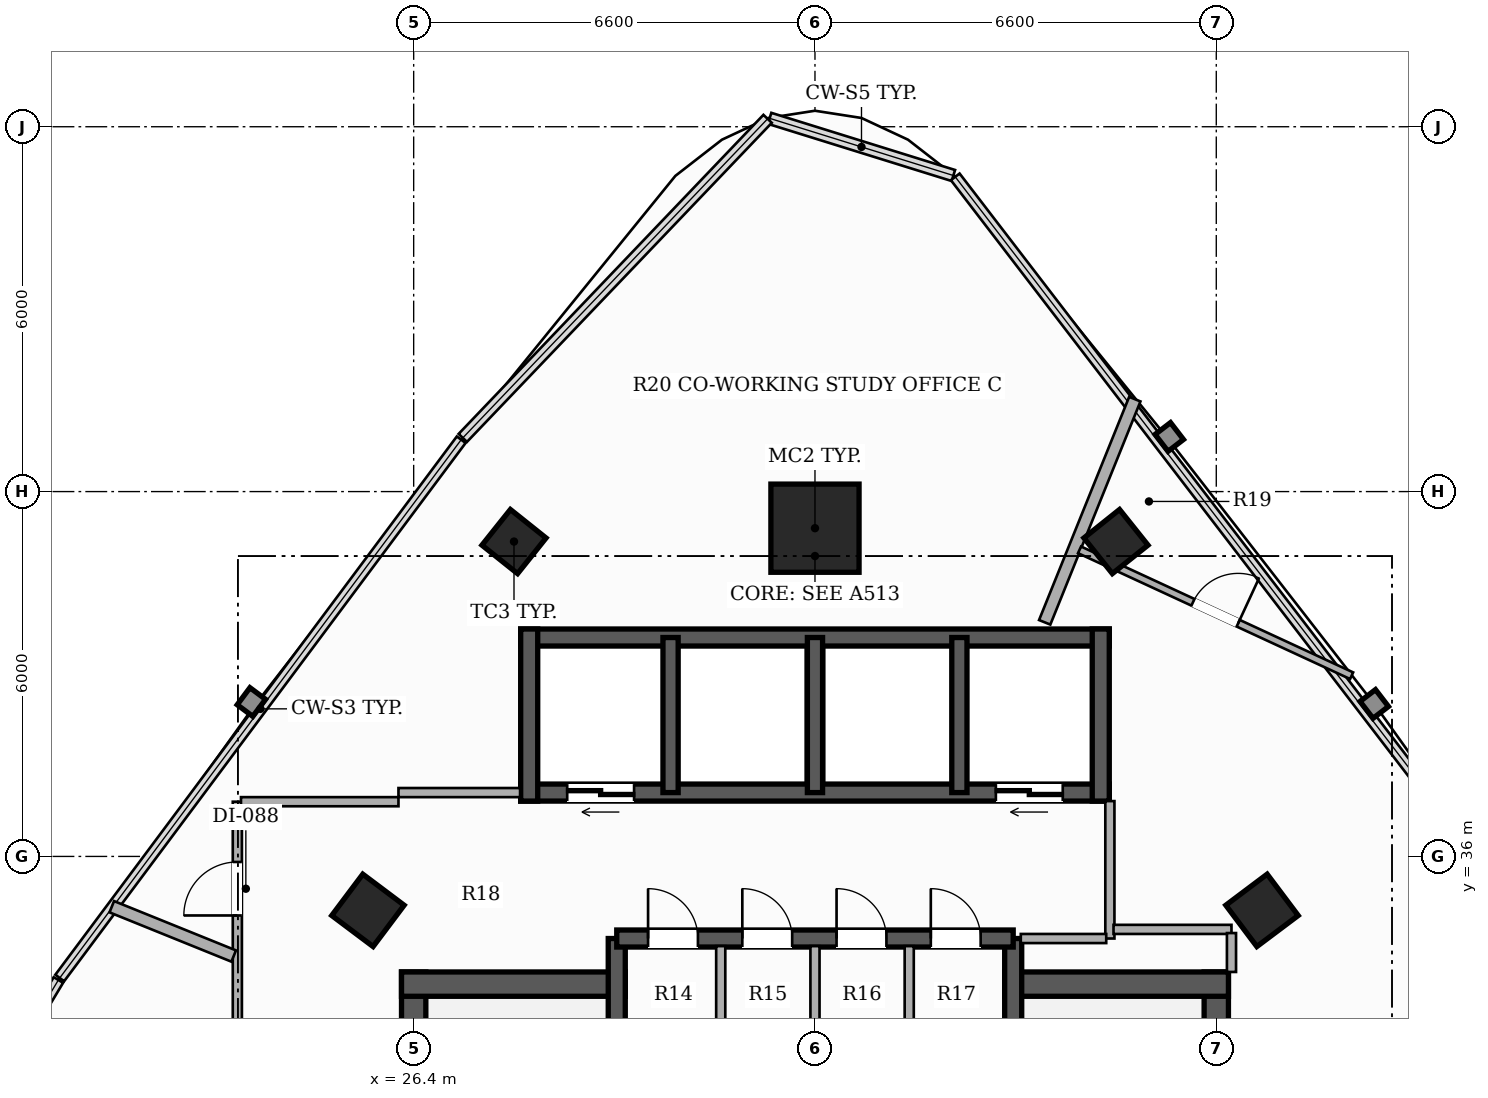
"""IFC4 building model, lengths in metres.
Left out: names, types, materials, properties, quantities, classifications, styles, units other than length and angle.
Written with IfcOpenShell. Run it as: python <this file> out.ifc"""

import sys

from ifc_helpers import new_model, si_unit, direction, frame, frame_2d, origin, origin_2d, place, context, subcontext, project, spatial, rectangle, hollow_rectangle, extrude, element, fill, save


model = new_model("IFC4")
c1 = context("Model", 3, precision=1e-05, world=origin(), true_north=direction((0.0, 1.0)))
c2 = subcontext(c1, "Body", "Model", "MODEL_VIEW")
j1 = project(units=[si_unit("LENGTHUNIT", "METRE"), si_unit("PLANEANGLEUNIT", "RADIAN")], contexts=[c1])
p1 = place(None, origin())
s1 = spatial("IfcSite", under=j1, at=p1, CompositionType="ELEMENT")
p2 = place(p1, origin())
s2 = spatial("IfcBuilding", under=s1, at=p2, CompositionType="ELEMENT")
p3 = place(p2, frame((0.0, 0.0, 157.25)))
s3 = spatial("IfcBuildingStorey", under=s2, at=p3, CompositionType="ELEMENT", Elevation=157.25)
p4 = place(p3, frame((26.4, 26.5, 0.0), z_axis=(0.0, 0.0, 1.0), x_axis=(0.0, 1.0, 0.0)))
e1 = element("IfcWall", 1, at=p4, inside=s3, PredefinedType="SHEAR", context=c2, shape_type="SweptSolid", body=[
    extrude(rectangle(XDim=7.6, YDim=0.4, at=frame_2d((3.8, 0.0))), origin(), (0.0, 0.0, 1.0), 3.3),
])
p5 = place(p3, frame((26.2, 33.9, 0.0), z_axis=(0.0, 0.0, 1.0), x_axis=(1.0, 0.0, 0.0)))
e2 = element("IfcWall", 2, at=p5, inside=s3, PredefinedType="SHEAR", context=c2, shape_type="SweptSolid", body=[
    extrude(rectangle(XDim=3.68, YDim=0.4, at=frame_2d((1.84, 0.0))), origin(), (0.0, 0.0, 1.0), 3.3),
])
p6 = place(p3, frame((39.6, 26.5, 0.0), z_axis=(0.0, 0.0, 1.0), x_axis=(0.0, 1.0, 0.0)))
e3 = element("IfcWall", 3, at=p6, inside=s3, PredefinedType="SHEAR", context=c2, shape_type="SweptSolid", body=[
    extrude(rectangle(XDim=7.6, YDim=0.4, at=frame_2d((3.8, 0.0))), origin(), (0.0, 0.0, 1.0), 3.3),
])
p7 = place(p3, frame((36.12, 33.9, 0.0), z_axis=(0.0, 0.0, 1.0), x_axis=(1.0, 0.0, 0.0)))
e4 = element("IfcWall", 4, at=p7, inside=s3, PredefinedType="SHEAR", context=c2, shape_type="SweptSolid", body=[
    extrude(rectangle(XDim=3.68, YDim=0.4, at=frame_2d((1.84, 0.0))), origin(), (0.0, 0.0, 1.0), 3.3),
])
p8 = place(p3, frame((29.74, 26.5, 0.0), z_axis=(0.0, 0.0, 1.0), x_axis=(0.0, 1.0, 0.0)))
e5 = element("IfcWall", 5, at=p8, inside=s3, PredefinedType="SHEAR", context=c2, shape_type="SweptSolid", body=[
    extrude(rectangle(XDim=8.15, YDim=0.28, at=frame_2d((4.075, 0.0))), origin(), (0.0, 0.0, 1.0), 3.3),
])
p9 = place(p8, frame((0.6, 0.0, 0.0)))
e6 = element("IfcOpeningElement", 6, at=p9, cuts=e5, PredefinedType="OPENING", context=c2, shape_type="SweptSolid", body=[
    extrude(rectangle(XDim=1.05, YDim=2.15, at=frame_2d((0.525, 1.075))), frame((0.0, 0.15, 0.0), z_axis=(0.0, -1.0, 0.0), x_axis=(1.0, 0.0, 0.0)), (0.0, 0.0, 1.0), 0.3),
])
p10 = place(p3, frame((36.26, 26.5, 0.0), z_axis=(0.0, 0.0, 1.0), x_axis=(0.0, 1.0, 0.0)))
e7 = element("IfcWall", 7, at=p10, inside=s3, PredefinedType="SHEAR", context=c2, shape_type="SweptSolid", body=[
    extrude(rectangle(XDim=8.15, YDim=0.28, at=frame_2d((4.075, 0.0))), origin(), (0.0, 0.0, 1.0), 3.3),
])
p11 = place(p10, frame((0.6, 0.0, 0.0)))
e8 = element("IfcOpeningElement", 8, at=p11, cuts=e7, PredefinedType="OPENING", context=c2, shape_type="SweptSolid", body=[
    extrude(rectangle(XDim=1.05, YDim=2.15, at=frame_2d((0.525, 1.075))), frame((0.0, 0.15, 0.0), z_axis=(0.0, -1.0, 0.0), x_axis=(1.0, 0.0, 0.0)), (0.0, 0.0, 1.0), 0.3),
])
p12 = place(p3, frame((29.74, 34.65, 0.0), z_axis=(0.0, 0.0, 1.0), x_axis=(1.0, 0.0, 0.0)))
e9 = element("IfcWall", 9, at=p12, inside=s3, PredefinedType="SHEAR", context=c2, shape_type="SweptSolid", body=[
    extrude(rectangle(XDim=6.52, YDim=0.28, at=frame_2d((3.26, 0.0))), origin(), (0.0, 0.0, 1.0), 3.3),
])
p13 = place(p12, frame((0.515, 0.0, 0.0)))
e10 = element("IfcOpeningElement", 10, at=p13, cuts=e9, PredefinedType="OPENING", context=c2, shape_type="SweptSolid", body=[
    extrude(rectangle(XDim=0.82, YDim=2.1, at=frame_2d((0.41, 1.05))), frame((0.0, 0.15, 0.0), z_axis=(0.0, -1.0, 0.0), x_axis=(1.0, 0.0, 0.0)), (0.0, 0.0, 1.0), 0.3),
])
p14 = place(p12, frame((2.065, 0.0, 0.0)))
e11 = element("IfcOpeningElement", 11, at=p14, cuts=e9, PredefinedType="OPENING", context=c2, shape_type="SweptSolid", body=[
    extrude(rectangle(XDim=0.82, YDim=2.1, at=frame_2d((0.41, 1.05))), frame((0.0, 0.15, 0.0), z_axis=(0.0, -1.0, 0.0), x_axis=(1.0, 0.0, 0.0)), (0.0, 0.0, 1.0), 0.3),
])
p15 = place(p12, frame((3.615, 0.0, 0.0)))
e12 = element("IfcOpeningElement", 12, at=p15, cuts=e9, PredefinedType="OPENING", context=c2, shape_type="SweptSolid", body=[
    extrude(rectangle(XDim=0.82, YDim=2.1, at=frame_2d((0.41, 1.05))), frame((0.0, 0.15, 0.0), z_axis=(0.0, -1.0, 0.0), x_axis=(1.0, 0.0, 0.0)), (0.0, 0.0, 1.0), 0.3),
])
p16 = place(p12, frame((5.165, 0.0, 0.0)))
e13 = element("IfcOpeningElement", 13, at=p16, cuts=e9, PredefinedType="OPENING", context=c2, shape_type="SweptSolid", body=[
    extrude(rectangle(XDim=0.82, YDim=2.1, at=frame_2d((0.41, 1.05))), frame((0.0, 0.15, 0.0), z_axis=(0.0, -1.0, 0.0), x_axis=(1.0, 0.0, 0.0)), (0.0, 0.0, 1.0), 0.3),
])
p17 = place(p3, frame((37.84, 37.05, 0.0), z_axis=(0.0, 0.0, 1.0), x_axis=(-1.0, 0.0, 0.0)))
e14 = element("IfcWall", 14, at=p17, inside=s3, PredefinedType="SHEAR", context=c2, shape_type="SweptSolid", body=[
    extrude(rectangle(XDim=9.68, YDim=0.28, at=frame_2d((4.84, 0.0))), origin(), (0.0, 0.0, 1.0), 3.3),
])
p18 = place(p17, frame((7.815, 0.0, 0.0)))
e15 = element("IfcOpeningElement", 15, at=p18, cuts=e14, PredefinedType="OPENING", context=c2, shape_type="SweptSolid", body=[
    extrude(rectangle(XDim=1.1, YDim=2.2, at=frame_2d((0.55, 1.1))), frame((0.0, 0.15, 0.0), z_axis=(0.0, -1.0, 0.0), x_axis=(1.0, 0.0, 0.0)), (0.0, 0.0, 1.0), 0.3),
])
p19 = place(p17, frame((0.765, 0.0, 0.0)))
e16 = element("IfcOpeningElement", 16, at=p19, cuts=e14, PredefinedType="OPENING", context=c2, shape_type="SweptSolid", body=[
    extrude(rectangle(XDim=1.1, YDim=2.2, at=frame_2d((0.55, 1.1))), frame((0.0, 0.15, 0.0), z_axis=(0.0, -1.0, 0.0), x_axis=(1.0, 0.0, 0.0)), (0.0, 0.0, 1.0), 0.3),
])
p20 = place(p3, frame((28.16, 39.6, 0.0), z_axis=(0.0, 0.0, 1.0), x_axis=(1.0, 0.0, 0.0)))
e17 = element("IfcWall", 17, at=p20, inside=s3, PredefinedType="SHEAR", context=c2, shape_type="SweptSolid", body=[
    extrude(rectangle(XDim=9.68, YDim=0.28, at=frame_2d((4.84, 0.0))), origin(), (0.0, 0.0, 1.0), 3.3),
])
for number, where, z_axis, x_axis in (
    (18, (28.3, 36.91, 0.0), (0.0, 0.0, 1.0), (0.0, 1.0, 0.0)),
    (19, (37.7, 36.91, 0.0), (0.0, 0.0, 1.0), (0.0, 1.0, 0.0)),
):
    element("IfcWall", number, at=place(p3, frame(where, z_axis=z_axis, x_axis=x_axis)), inside=s3, PredefinedType="SHEAR", context=c2, shape_type="SweptSolid", body=[
        extrude(rectangle(XDim=2.83, YDim=0.28, at=frame_2d((1.415, 0.0))), origin(), (0.0, 0.0, 1.0), 3.3),
    ])
for number, where, z_axis, x_axis in (
    (20, (30.625, 37.05, 0.0), (0.0, 0.0, 1.0), (0.0, 1.0, 0.0)),
    (21, (33.0, 37.05, 0.0), (0.0, 0.0, 1.0), (0.0, 1.0, 0.0)),
    (22, (35.375, 37.05, 0.0), (0.0, 0.0, 1.0), (0.0, 1.0, 0.0)),
):
    element("IfcWall", number, at=place(p3, frame(where, z_axis=z_axis, x_axis=x_axis)), inside=s3, PredefinedType="SHEAR", context=c2, shape_type="SweptSolid", body=[
        extrude(rectangle(XDim=2.55, YDim=0.25, at=frame_2d((1.275, 0.0))), origin(), (0.0, 0.0, 1.0), 3.3),
    ])
p21 = place(p3, frame((33.0, 41.398, 0.0), z_axis=(0.0, 0.0, 1.0), x_axis=(1.0, 0.0, 0.0)))
e23 = element("IfcColumn", 23, at=p21, inside=s3, PredefinedType="COLUMN", context=c2, shape_type="SweptSolid", body=[
    extrude(hollow_rectangle(XDim=1.45, YDim=1.45, WallThickness=0.045, at=origin_2d()), origin(), (0.0, 0.0, 1.0), 3.3),
])
for number, where, z_axis, x_axis in (
    (24, (25.648, 35.113, 0.0), (0.0, 0.0, 1.0), (0.6, 0.8, 0.0)),
    (25, (40.352, 35.113, 0.0), (0.0, 0.0, 1.0), (-0.6, 0.8, 0.0)),
):
    element("IfcColumn", number, at=place(p3, frame(where, z_axis=z_axis, x_axis=x_axis)), inside=s3, PredefinedType="COLUMN", context=c2, shape_type="SweptSolid", body=[
        extrude(hollow_rectangle(XDim=0.85, YDim=0.85, WallThickness=0.028, at=origin_2d()), origin(), (0.0, 0.0, 1.0), 3.3),
    ])
for number, where, z_axis, x_axis in (
    (26, (28.05, 41.178, 0.0), (0.0, 0.0, 1.0), (0.624, 0.782, 0.0)),
    (27, (37.95, 41.178, 0.0), (0.0, 0.0, 1.0), (-0.624, 0.782, 0.0)),
):
    element("IfcColumn", number, at=place(p3, frame(where, z_axis=z_axis, x_axis=x_axis)), inside=s3, PredefinedType="COLUMN", context=c2, shape_type="SweptSolid", body=[
        extrude(hollow_rectangle(XDim=0.75, YDim=0.75, WallThickness=0.025, at=origin_2d()), origin(), (0.0, 0.0, 1.0), 3.3),
    ])
p22 = place(p3, frame((37.85, 34.65, 0.0), z_axis=(0.0, 0.0, 1.0), x_axis=(0.0, 1.0, 0.0)))
e28 = element("IfcWall", 28, at=p22, inside=s3, PredefinedType="PARTITIONING", context=c2, shape_type="SweptSolid", body=[
    extrude(rectangle(XDim=2.26, YDim=0.15, at=frame_2d((1.13, 0.0))), origin(), (0.0, 0.0, 1.0), 3.06),
])
p23 = place(p3, frame((36.385, 34.65, 0.0), z_axis=(0.0, 0.0, 1.0), x_axis=(1.0, 0.0, 0.0)))
e29 = element("IfcWall", 29, at=p23, inside=s3, PredefinedType="PARTITIONING", context=c2, shape_type="SweptSolid", body=[
    extrude(rectangle(XDim=1.405, YDim=0.15, at=frame_2d((0.703, 0.0))), origin(), (0.0, 0.0, 1.0), 2.425),
])
for number, where, z_axis, x_axis in (
    (30, (31.45, 32.915, 0.0), (0.0, 0.0, 1.0), (0.0, 1.0, 0.0)),
    (31, (33.0, 32.915, 0.0), (0.0, 0.0, 1.0), (0.0, 1.0, 0.0)),
    (32, (34.55, 32.915, 0.0), (0.0, 0.0, 1.0), (0.0, 1.0, 0.0)),
):
    element("IfcWall", number, at=place(p3, frame(where, z_axis=z_axis, x_axis=x_axis)), inside=s3, PredefinedType="PARTITIONING", context=c2, shape_type="SweptSolid", body=[
        extrude(rectangle(XDim=1.61, YDim=0.15, at=frame_2d((0.805, 0.0))), origin(), (0.0, 0.0, 1.0), 3.06),
    ])
p24 = place(p3, frame((23.5, 14.06, 0.0), z_axis=(0.0, 0.0, 1.0), x_axis=(0.0, 1.0, 0.0)))
e33 = element("IfcWall", 33, at=p24, inside=s3, PredefinedType="PARTITIONING", context=c2, shape_type="SweptSolid", body=[
    extrude(rectangle(XDim=22.84, YDim=0.15, at=frame_2d((11.42, 0.0))), origin(), (0.0, 0.0, 1.0), 2.413),
])
p25 = place(p24, frame((8.172, 0.0, 0.0)))
e34 = element("IfcOpeningElement", 34, at=p25, cuts=e33, PredefinedType="OPENING", context=c2, shape_type="SweptSolid", body=[
    extrude(rectangle(XDim=0.88, YDim=2.1, at=frame_2d((0.44, 1.05))), frame((0.0, 0.085, 0.0), z_axis=(0.0, -1.0, 0.0), x_axis=(1.0, 0.0, 0.0)), (0.0, 0.0, 1.0), 0.17),
])
p26 = place(p24, frame((20.969, 0.0, 0.0)))
e35 = element("IfcOpeningElement", 35, at=p26, cuts=e33, PredefinedType="OPENING", context=c2, shape_type="SweptSolid", body=[
    extrude(rectangle(XDim=0.88, YDim=2.1, at=frame_2d((0.44, 1.05))), frame((0.0, 0.085, 0.0), z_axis=(0.0, -1.0, 0.0), x_axis=(1.0, 0.0, 0.0)), (0.0, 0.0, 1.0), 0.17),
])
p27 = place(p24, frame((15.484, 0.0, 0.0)))
e36 = element("IfcOpeningElement", 36, at=p27, cuts=e33, PredefinedType="OPENING", context=c2, shape_type="SweptSolid", body=[
    extrude(rectangle(XDim=0.88, YDim=2.1, at=frame_2d((0.44, 1.05))), frame((0.0, 0.085, 0.0), z_axis=(0.0, -1.0, 0.0), x_axis=(1.0, 0.0, 0.0)), (0.0, 0.0, 1.0), 0.17),
])
p28 = place(p3, frame((23.56, 36.9, 0.0), z_axis=(0.0, 0.0, 1.0), x_axis=(1.0, 0.0, 0.0)))
e37 = element("IfcWall", 37, at=p28, inside=s3, PredefinedType="PARTITIONING", context=c2, shape_type="SweptSolid", body=[
    extrude(rectangle(XDim=2.59, YDim=0.15, at=frame_2d((1.295, 0.0))), origin(), (0.0, 0.0, 1.0), 2.413),
])
p29 = place(p3, frame((26.15, 37.05, 0.0), z_axis=(0.0, 0.0, 1.0), x_axis=(1.0, 0.0, 0.0)))
e38 = element("IfcWall", 38, at=p29, inside=s3, PredefinedType="PARTITIONING", context=c2, shape_type="SweptSolid", body=[
    extrude(rectangle(XDim=2.0, YDim=0.15, at=frame_2d((1.0, 0.0))), origin(), (0.0, 0.0, 1.0), 2.413),
])
p30 = place(p3, frame((37.91, 34.8, 0.0), z_axis=(0.0, 0.0, 1.0), x_axis=(1.0, 0.0, 0.0)))
e39 = element("IfcWall", 39, at=p30, inside=s3, PredefinedType="PARTITIONING", context=c2, shape_type="SweptSolid", body=[
    extrude(rectangle(XDim=1.94, YDim=0.15, at=frame_2d((0.97, 0.0))), origin(), (0.0, 0.0, 1.0), 2.721),
])
p31 = place(p3, frame((39.85, 34.74, 0.0), z_axis=(0.0, 0.0, 1.0), x_axis=(0.0, -1.0, 0.0)))
e40 = element("IfcWall", 40, at=p31, inside=s3, PredefinedType="PARTITIONING", context=c2, shape_type="SweptSolid", body=[
    extrude(rectangle(XDim=0.64, YDim=0.15, at=frame_2d((0.32, 0.0))), origin(), (0.0, 0.0, 1.0), 2.721),
])
p32 = place(p3, frame((36.778, 39.85, 0.0), z_axis=(0.0, 0.0, 1.0), x_axis=(0.374430412004, 0.927255017008, 0.0)))
e41 = element("IfcWall", 41, at=p32, inside=s3, PredefinedType="PARTITIONING", context=c2, shape_type="SweptSolid", body=[
    extrude(rectangle(XDim=3.958, YDim=0.2, at=frame_2d((1.979, 0.0))), origin(), (0.0, 0.0, 1.0), 2.413),
])
p33 = place(p3, frame((23.44, 34.362, 0.0), z_axis=(0.0, 0.0, 1.0), x_axis=(-0.927021575741, 0.375007997395, 0.0)))
e42 = element("IfcWall", 42, at=p33, inside=s3, PredefinedType="PARTITIONING", context=c2, shape_type="SweptSolid", body=[
    extrude(rectangle(XDim=2.163, YDim=0.2, at=frame_2d((1.081, 0.0))), origin(), (0.0, 0.0, 1.0), 3.06),
])
p34 = place(p3, frame((37.351, 41.042, 0.0), z_axis=(0.0, 0.0, 1.0), x_axis=(0.907592371503, -0.419852458834, 0.0)))
e43 = element("IfcWall", 43, at=p34, inside=s3, PredefinedType="PARTITIONING", context=c2, shape_type="SweptSolid", body=[
    extrude(rectangle(XDim=4.93, YDim=0.12, at=frame_2d((2.465, 0.0))), origin(), (0.0, 0.0, 1.0), 2.413),
])
p35 = place(p34, frame((2.055, 0.0, 0.0)))
e44 = element("IfcOpeningElement", 44, at=p35, cuts=e43, PredefinedType="OPENING", context=c2, shape_type="SweptSolid", body=[
    extrude(rectangle(XDim=0.82, YDim=2.1, at=frame_2d((0.41, 1.05))), frame((0.0, 0.07, 0.0), z_axis=(0.0, -1.0, 0.0), x_axis=(1.0, 0.0, 0.0)), (0.0, 0.0, 1.0), 0.14),
])
p36 = place(p18, origin())
e45 = element("IfcDoor", 45, at=p36, inside=s3, OperationType="DOUBLE_DOOR_SLIDING", PredefinedType="DOOR", context=c2, shape_type="SweptSolid", body=[
    extrude(rectangle(XDim=1.1, YDim=2.2, at=frame_2d((0.55, 1.1))), frame((0.0, 0.025, 0.0), z_axis=(0.0, -1.0, 0.0), x_axis=(1.0, 0.0, 0.0)), (0.0, 0.0, 1.0), 0.05),
])
fill(e15, e45)
p37 = place(p19, origin())
e46 = element("IfcDoor", 46, at=p37, inside=s3, OperationType="DOUBLE_DOOR_SLIDING", PredefinedType="DOOR", context=c2, shape_type="SweptSolid", body=[
    extrude(rectangle(XDim=1.1, YDim=2.2, at=frame_2d((0.55, 1.1))), frame((0.0, 0.025, 0.0), z_axis=(0.0, -1.0, 0.0), x_axis=(1.0, 0.0, 0.0)), (0.0, 0.0, 1.0), 0.05),
])
fill(e16, e46)
p38 = place(p13, origin())
e47 = element("IfcDoor", 47, at=p38, inside=s3, OperationType="SINGLE_SWING_LEFT", PredefinedType="DOOR", context=c2, shape_type="SweptSolid", body=[
    extrude(rectangle(XDim=0.82, YDim=2.1, at=frame_2d((0.41, 1.05))), frame((0.0, 0.025, 0.0), z_axis=(0.0, -1.0, 0.0), x_axis=(1.0, 0.0, 0.0)), (0.0, 0.0, 1.0), 0.05),
])
fill(e10, e47)
p39 = place(p14, origin())
e48 = element("IfcDoor", 48, at=p39, inside=s3, OperationType="SINGLE_SWING_LEFT", PredefinedType="DOOR", context=c2, shape_type="SweptSolid", body=[
    extrude(rectangle(XDim=0.82, YDim=2.1, at=frame_2d((0.41, 1.05))), frame((0.0, 0.025, 0.0), z_axis=(0.0, -1.0, 0.0), x_axis=(1.0, 0.0, 0.0)), (0.0, 0.0, 1.0), 0.05),
])
fill(e11, e48)
p40 = place(p15, origin())
e49 = element("IfcDoor", 49, at=p40, inside=s3, OperationType="SINGLE_SWING_LEFT", PredefinedType="DOOR", context=c2, shape_type="SweptSolid", body=[
    extrude(rectangle(XDim=0.82, YDim=2.1, at=frame_2d((0.41, 1.05))), frame((0.0, 0.025, 0.0), z_axis=(0.0, -1.0, 0.0), x_axis=(1.0, 0.0, 0.0)), (0.0, 0.0, 1.0), 0.05),
])
fill(e12, e49)
p41 = place(p16, origin())
e50 = element("IfcDoor", 50, at=p41, inside=s3, OperationType="SINGLE_SWING_LEFT", PredefinedType="DOOR", context=c2, shape_type="SweptSolid", body=[
    extrude(rectangle(XDim=0.82, YDim=2.1, at=frame_2d((0.41, 1.05))), frame((0.0, 0.025, 0.0), z_axis=(0.0, -1.0, 0.0), x_axis=(1.0, 0.0, 0.0)), (0.0, 0.0, 1.0), 0.05),
])
fill(e13, e50)
p42 = place(p35, origin())
e51 = element("IfcDoor", 51, at=p42, inside=s3, OperationType="SINGLE_SWING_RIGHT", PredefinedType="DOOR", context=c2, shape_type="SweptSolid", body=[
    extrude(rectangle(XDim=0.82, YDim=2.1, at=frame_2d((0.41, 1.05))), frame((0.0, 0.025, 0.0), z_axis=(0.0, -1.0, 0.0), x_axis=(1.0, 0.0, 0.0)), (0.0, 0.0, 1.0), 0.05),
])
fill(e44, e51)
p43 = place(p26, origin())
e52 = element("IfcDoor", 52, at=p43, inside=s3, OperationType="SINGLE_SWING_LEFT", PredefinedType="DOOR", context=c2, shape_type="SweptSolid", body=[
    extrude(rectangle(XDim=0.88, YDim=2.1, at=frame_2d((0.44, 1.05))), frame((0.0, 0.025, 0.0), z_axis=(0.0, -1.0, 0.0), x_axis=(1.0, 0.0, 0.0)), (0.0, 0.0, 1.0), 0.05),
])
fill(e35, e52)
save(model, sys.argv[1])
